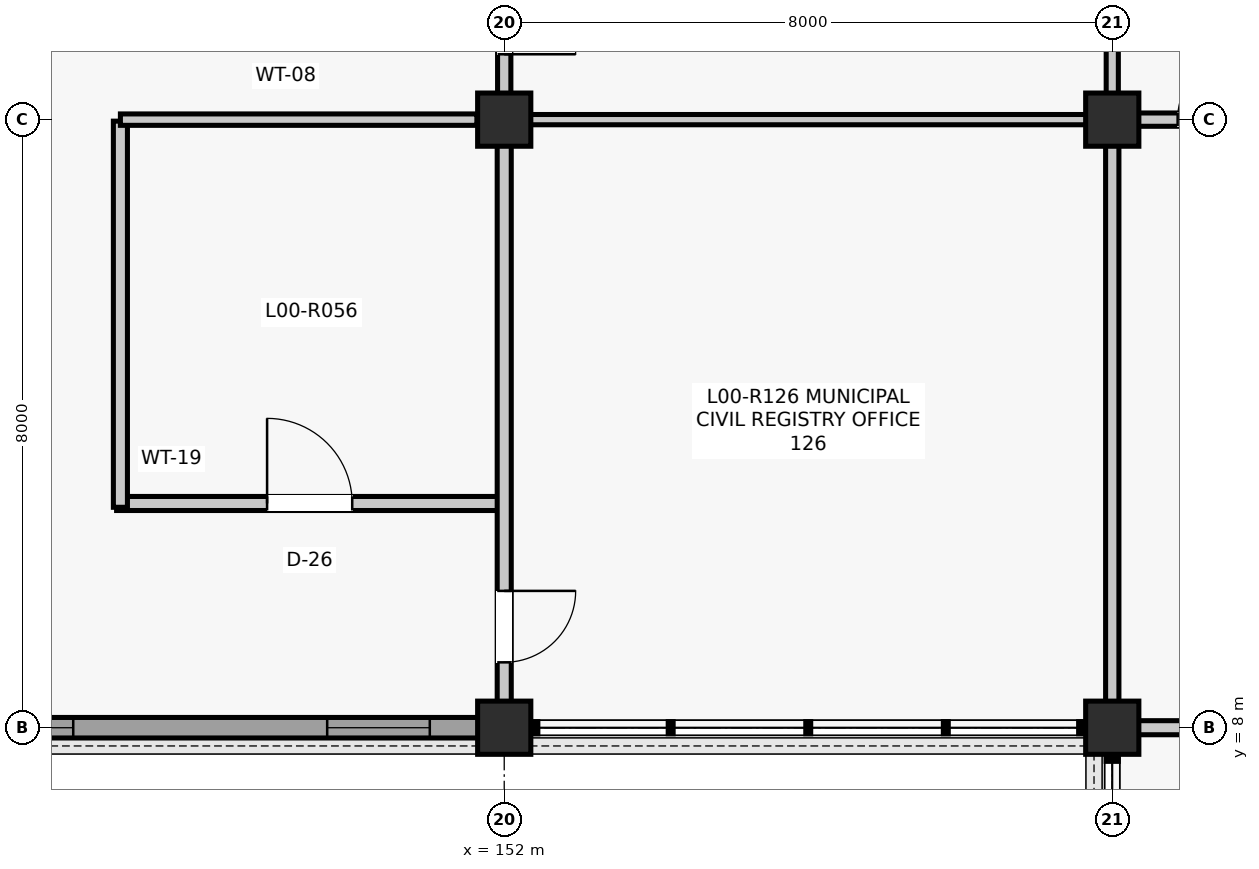
"""IFC4 building model, lengths in metres.
Left out: names, types, materials, properties, quantities, classifications, styles, units other than length and angle.
Written with IfcOpenShell. Run it as: python <this file> out.ifc"""

import sys

from ifc_helpers import new_model, si_unit, direction, frame, frame_2d, origin, origin_2d, place, context, subcontext, project, spatial, rectangle, extrude, element, fill, save


model = new_model("IFC4")
c1 = context("Model", 3, precision=1e-05, world=origin(), true_north=direction((0.0, 1.0)))
c2 = subcontext(c1, "Body", "Model", "MODEL_VIEW")
j1 = project(units=[si_unit("LENGTHUNIT", "METRE"), si_unit("PLANEANGLEUNIT", "RADIAN")], contexts=[c1])
p1 = place(None, origin())
s1 = spatial("IfcSite", under=j1, at=p1, CompositionType="ELEMENT")
p2 = place(p1, origin())
s2 = spatial("IfcBuilding", under=s1, at=p2, CompositionType="ELEMENT")
p3 = place(p2, origin())
s3 = spatial("IfcBuildingStorey", under=s2, at=p3, CompositionType="ELEMENT", Elevation=0.0)
for number, where, z_axis, x_axis in (
    (1, (152.0, 8.0, 0.0), (0.0, 0.0, 1.0), (1.0, 0.0, 0.0)),
    (2, (152.0, 16.0, 0.0), (0.0, 0.0, 1.0), (1.0, 0.0, 0.0)),
    (3, (160.0, 8.0, 0.0), (0.0, 0.0, 1.0), (1.0, 0.0, 0.0)),
    (4, (160.0, 16.0, 0.0), (0.0, 0.0, 1.0), (1.0, 0.0, 0.0)),
):
    element("IfcColumn", number, at=place(p3, frame(where, z_axis=z_axis, x_axis=x_axis)), inside=s3, PredefinedType="COLUMN", context=c2, shape_type="SweptSolid", body=[
        extrude(rectangle(XDim=0.7, YDim=0.7, at=origin_2d()), origin(), (0.0, 0.0, 1.0), 5.28),
    ])
p4 = place(p3, frame((144.335, 8.0, 0.0), z_axis=(0.0, 0.0, 1.0), x_axis=(1.0, 0.0, 0.0)))
e5 = element("IfcWall", 5, at=p4, inside=s3, PredefinedType="SOLIDWALL", context=c2, shape_type="SweptSolid", body=[
    extrude(rectangle(XDim=7.33, YDim=0.27, at=frame_2d((3.665, 0.0))), origin(), (0.0, 0.0, 1.0), 4.677),
])
p5 = place(p4, frame((0.644, 0.0, 0.95)))
e6 = element("IfcOpeningElement", 6, at=p5, cuts=e5, PredefinedType="OPENING", context=c2, shape_type="SweptSolid", body=[
    extrude(rectangle(XDim=1.35, YDim=1.9, at=frame_2d((0.675, 0.95))), frame((0.0, 0.145, 0.0), z_axis=(0.0, -1.0, 0.0), x_axis=(1.0, 0.0, 0.0)), (0.0, 0.0, 1.0), 0.29),
])
p6 = place(p4, frame((5.336, 0.0, 0.95)))
e7 = element("IfcOpeningElement", 7, at=p6, cuts=e5, PredefinedType="OPENING", context=c2, shape_type="SweptSolid", body=[
    extrude(rectangle(XDim=1.35, YDim=1.9, at=frame_2d((0.675, 0.95))), frame((0.0, 0.145, 0.0), z_axis=(0.0, -1.0, 0.0), x_axis=(1.0, 0.0, 0.0)), (0.0, 0.0, 1.0), 0.29),
])
p7 = place(p3, frame((146.9, 10.95, 0.0), z_axis=(0.0, 0.0, 1.0), x_axis=(1.0, 0.0, 0.0)))
e8 = element("IfcWall", 8, at=p7, inside=s3, PredefinedType="PARTITIONING", context=c2, shape_type="SweptSolid", body=[
    extrude(rectangle(XDim=5.08, YDim=0.185, at=frame_2d((2.54, 0.0))), origin(), (0.0, 0.0, 1.0), 4.403),
])
p8 = place(p7, frame((1.98, 0.0, 0.0)))
e9 = element("IfcOpeningElement", 9, at=p8, cuts=e8, PredefinedType="OPENING", context=c2, shape_type="SweptSolid", body=[
    extrude(rectangle(XDim=1.12, YDim=2.22, at=frame_2d((0.56, 1.11))), frame((0.0, 0.103, 0.0), z_axis=(0.0, -1.0, 0.0), x_axis=(1.0, 0.0, 0.0)), (0.0, 0.0, 1.0), 0.205),
])
p9 = place(p3, frame((146.95, 10.9, 0.0), z_axis=(0.0, 0.0, 1.0), x_axis=(0.0, 1.0, 0.0)))
e10 = element("IfcWall", 10, at=p9, inside=s3, PredefinedType="PARTITIONING", context=c2, shape_type="SweptSolid", body=[
    extrude(rectangle(XDim=5.08, YDim=0.185, at=frame_2d((2.54, 0.0))), origin(), (0.0, 0.0, 1.0), 4.603),
])
p10 = place(p3, frame((146.95, 16.0, 0.0), z_axis=(0.0, 0.0, 1.0), x_axis=(1.0, 0.0, 0.0)))
e11 = element("IfcWall", 11, at=p10, inside=s3, PredefinedType="PARTITIONING", context=c2, shape_type="SweptSolid", body=[
    extrude(rectangle(XDim=4.69, YDim=0.15, at=frame_2d((2.345, 0.0))), origin(), (0.0, 0.0, 1.0), 4.603),
])
p11 = place(p3, frame((152.0, 8.34, 0.0), z_axis=(0.0, 0.0, 1.0), x_axis=(0.0, 1.0, 0.0)))
e12 = element("IfcWall", 12, at=p11, inside=s3, PredefinedType="PARTITIONING", context=c2, shape_type="SweptSolid", body=[
    extrude(rectangle(XDim=7.32, YDim=0.185, at=frame_2d((3.66, 0.0))), origin(), (0.0, 0.0, 1.0), 4.403),
])
p12 = place(p11, frame((0.52, 0.0, 0.0)))
e13 = element("IfcOpeningElement", 13, at=p12, cuts=e12, PredefinedType="OPENING", context=c2, shape_type="SweptSolid", body=[
    extrude(rectangle(XDim=0.94, YDim=2.12, at=frame_2d((0.47, 1.06))), frame((0.0, 0.103, 0.0), z_axis=(0.0, -1.0, 0.0), x_axis=(1.0, 0.0, 0.0)), (0.0, 0.0, 1.0), 0.205),
])
p13 = place(p3, frame((152.0, 16.34, 0.0), z_axis=(0.0, 0.0, 1.0), x_axis=(0.0, 1.0, 0.0)))
e14 = element("IfcWall", 14, at=p13, inside=s3, PredefinedType="PARTITIONING", context=c2, shape_type="SweptSolid", body=[
    extrude(rectangle(XDim=7.32, YDim=0.175, at=frame_2d((3.66, 0.0))), origin(), (0.0, 0.0, 1.0), 5.025),
])
p14 = place(p13, frame((0.52, 0.0, 0.0)))
e15 = element("IfcOpeningElement", 15, at=p14, cuts=e14, PredefinedType="OPENING", context=c2, shape_type="SweptSolid", body=[
    extrude(rectangle(XDim=0.94, YDim=2.12, at=frame_2d((0.47, 1.06))), frame((0.0, 0.097, 0.0), z_axis=(0.0, -1.0, 0.0), x_axis=(1.0, 0.0, 0.0)), (0.0, 0.0, 1.0), 0.195),
])
p15 = place(p3, frame((160.0, 8.34, 0.0), z_axis=(0.0, 0.0, 1.0), x_axis=(0.0, 1.0, 0.0)))
e16 = element("IfcWall", 16, at=p15, inside=s3, PredefinedType="PARTITIONING", context=c2, shape_type="SweptSolid", body=[
    extrude(rectangle(XDim=7.32, YDim=0.175, at=frame_2d((3.66, 0.0))), origin(), (0.0, 0.0, 1.0), 4.412),
])
p16 = place(p3, frame((152.34, 16.0, 0.0), z_axis=(0.0, 0.0, 1.0), x_axis=(1.0, 0.0, 0.0)))
e17 = element("IfcWall", 17, at=p16, inside=s3, PredefinedType="PARTITIONING", context=c2, shape_type="SweptSolid", body=[
    extrude(rectangle(XDim=7.32, YDim=0.135, at=frame_2d((3.66, 0.0))), origin(), (0.0, 0.0, 1.0), 4.667),
])
p17 = place(p3, frame((160.0, 16.34, 0.0), z_axis=(0.0, 0.0, 1.0), x_axis=(0.0, 1.0, 0.0)))
e18 = element("IfcWall", 18, at=p17, inside=s3, PredefinedType="PARTITIONING", context=c2, shape_type="SweptSolid", body=[
    extrude(rectangle(XDim=7.32, YDim=0.16, at=frame_2d((3.66, 0.0))), origin(), (0.0, 0.0, 1.0), 4.607),
])
p18 = place(p3, frame((160.34, 8.0, 0.0), z_axis=(0.0, 0.0, 1.0), x_axis=(1.0, 0.0, 0.0)))
e19 = element("IfcWall", 19, at=p18, inside=s3, PredefinedType="PARTITIONING", context=c2, shape_type="SweptSolid", body=[
    extrude(rectangle(XDim=7.32, YDim=0.185, at=frame_2d((3.66, 0.0))), origin(), (0.0, 0.0, 1.0), 4.403),
])
p19 = place(p18, frame((3.14, 0.0, 0.0)))
e20 = element("IfcOpeningElement", 20, at=p19, cuts=e19, PredefinedType="OPENING", context=c2, shape_type="SweptSolid", body=[
    extrude(rectangle(XDim=1.04, YDim=2.18, at=frame_2d((0.52, 1.09))), frame((0.0, 0.103, 0.0), z_axis=(0.0, -1.0, 0.0), x_axis=(1.0, 0.0, 0.0)), (0.0, 0.0, 1.0), 0.205),
])
p20 = place(p3, frame((160.34, 16.0, 0.0), z_axis=(0.0, 0.0, 1.0), x_axis=(1.0, 0.0, 0.0)))
e21 = element("IfcWall", 21, at=p20, inside=s3, PredefinedType="PARTITIONING", context=c2, shape_type="SweptSolid", body=[
    extrude(rectangle(XDim=7.27, YDim=0.175, at=frame_2d((3.635, 0.0))), origin(), (0.0, 0.0, 1.0), 4.336),
])
p21 = place(p20, frame((0.52, 0.0, 0.0)))
e22 = element("IfcOpeningElement", 22, at=p21, cuts=e21, PredefinedType="OPENING", context=c2, shape_type="SweptSolid", body=[
    extrude(rectangle(XDim=0.94, YDim=2.12, at=frame_2d((0.47, 1.06))), frame((0.0, 0.097, 0.0), z_axis=(0.0, -1.0, 0.0), x_axis=(1.0, 0.0, 0.0)), (0.0, 0.0, 1.0), 0.195),
])
p22 = place(p5, origin())
e23 = element("IfcWindow", 23, at=p22, inside=s3, PartitioningType="SINGLE_PANEL", PredefinedType="WINDOW", context=c2, shape_type="SweptSolid", body=[
    extrude(rectangle(XDim=1.35, YDim=1.9, at=frame_2d((0.675, 0.95))), frame((0.0, 0.03, 0.0), z_axis=(0.0, -1.0, 0.0), x_axis=(1.0, 0.0, 0.0)), (0.0, 0.0, 1.0), 0.06),
])
fill(e6, e23)
p23 = place(p6, origin())
e24 = element("IfcWindow", 24, at=p23, inside=s3, PartitioningType="SINGLE_PANEL", PredefinedType="WINDOW", context=c2, shape_type="SweptSolid", body=[
    extrude(rectangle(XDim=1.35, YDim=1.9, at=frame_2d((0.675, 0.95))), frame((0.0, 0.03, 0.0), z_axis=(0.0, -1.0, 0.0), x_axis=(1.0, 0.0, 0.0)), (0.0, 0.0, 1.0), 0.06),
])
fill(e7, e24)
p24 = place(p8, origin())
e25 = element("IfcDoor", 25, at=p24, inside=s3, OperationType="SINGLE_SWING_LEFT", PredefinedType="DOOR", context=c2, shape_type="SweptSolid", body=[
    extrude(rectangle(XDim=1.12, YDim=2.22, at=frame_2d((0.56, 1.11))), frame((0.0, 0.025, 0.0), z_axis=(0.0, -1.0, 0.0), x_axis=(1.0, 0.0, 0.0)), (0.0, 0.0, 1.0), 0.05),
])
fill(e9, e25)
p25 = place(p12, frame((0.94, 0.0, 0.0), z_axis=(0.0, 0.0, 1.0), x_axis=(-1.0, 0.0, 0.0)))
e26 = element("IfcDoor", 26, at=p25, inside=s3, OperationType="SINGLE_SWING_RIGHT", PredefinedType="DOOR", context=c2, shape_type="SweptSolid", body=[
    extrude(rectangle(XDim=0.94, YDim=2.12, at=frame_2d((0.47, 1.06))), frame((0.0, 0.025, 0.0), z_axis=(0.0, -1.0, 0.0), x_axis=(1.0, 0.0, 0.0)), (0.0, 0.0, 1.0), 0.05),
])
fill(e13, e26)
p26 = place(p14, frame((0.94, 0.0, 0.0), z_axis=(0.0, 0.0, 1.0), x_axis=(-1.0, 0.0, 0.0)))
e27 = element("IfcDoor", 27, at=p26, inside=s3, OperationType="SINGLE_SWING_LEFT", PredefinedType="DOOR", context=c2, shape_type="SweptSolid", body=[
    extrude(rectangle(XDim=0.94, YDim=2.12, at=frame_2d((0.47, 1.06))), frame((0.0, 0.025, 0.0), z_axis=(0.0, -1.0, 0.0), x_axis=(1.0, 0.0, 0.0)), (0.0, 0.0, 1.0), 0.05),
])
fill(e15, e27)
p27 = place(p21, origin())
e28 = element("IfcDoor", 28, at=p27, inside=s3, OperationType="SINGLE_SWING_RIGHT", PredefinedType="DOOR", context=c2, shape_type="SweptSolid", body=[
    extrude(rectangle(XDim=0.94, YDim=2.12, at=frame_2d((0.47, 1.06))), frame((0.0, 0.025, 0.0), z_axis=(0.0, -1.0, 0.0), x_axis=(1.0, 0.0, 0.0)), (0.0, 0.0, 1.0), 0.05),
])
fill(e22, e28)
save(model, sys.argv[1])
